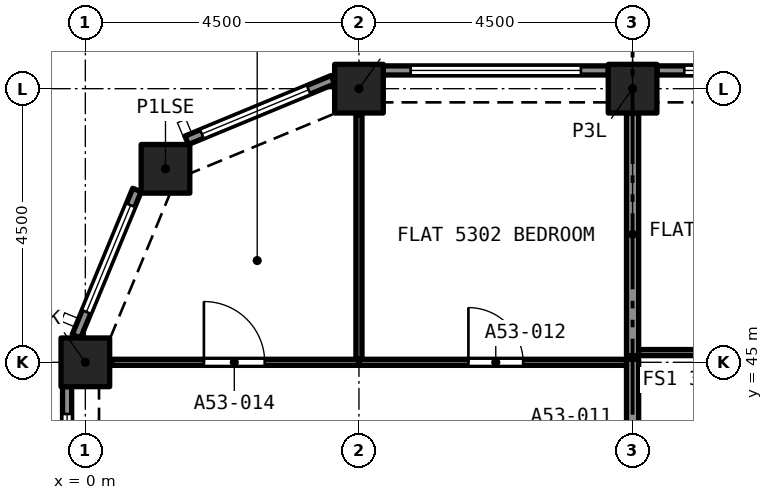
"""IFC4 building model, lengths in metres.
Left out: names, types, materials, properties, quantities, classifications, styles, units other than length and angle.
Written with IfcOpenShell. Run it as: python <this file> out.ifc"""

import sys

from ifc_helpers import new_model, si_unit, direction, frame, frame_2d, origin, origin_2d, place, context, subcontext, project, spatial, rectangle, extrude, element, fill, save


model = new_model("IFC4")
c1 = context("Model", 3, precision=1e-05, world=origin(), true_north=direction((0.0, 1.0)))
c2 = subcontext(c1, "Body", "Model", "MODEL_VIEW")
j1 = project(units=[si_unit("LENGTHUNIT", "METRE"), si_unit("PLANEANGLEUNIT", "RADIAN")], contexts=[c1])
p1 = place(None, origin())
s1 = spatial("IfcSite", under=j1, at=p1, CompositionType="ELEMENT")
p2 = place(p1, origin())
s2 = spatial("IfcBuilding", under=s1, at=p2, CompositionType="ELEMENT")
p3 = place(p2, frame((0.0, 0.0, 192.3)))
s3 = spatial("IfcBuildingStorey", under=s2, at=p3, CompositionType="ELEMENT", Elevation=192.3)
for number, where, z_axis, x_axis in (
    (1, (0.0, 45.0, 0.0), (0.0, 0.0, 1.0), (1.0, 0.0, 0.0)),
    (2, (1.318, 48.182, 0.0), (0.0, 0.0, 1.0), (1.0, 0.0, 0.0)),
    (3, (4.5, 49.5, 0.0), (0.0, 0.0, 1.0), (1.0, 0.0, 0.0)),
    (4, (9.0, 49.5, 0.0), (0.0, 0.0, 1.0), (1.0, 0.0, 0.0)),
):
    element("IfcColumn", number, at=place(p3, frame(where, z_axis=z_axis, x_axis=x_axis)), inside=s3, PredefinedType="COLUMN", context=c2, shape_type="SweptSolid", body=[
        extrude(rectangle(XDim=0.8, YDim=0.8, at=origin_2d()), origin(), (0.0, 0.0, 1.0), 3.2),
    ])
p4 = place(p3, frame((9.4, 49.8, 0.0), z_axis=(0.0, 0.0, 1.0), x_axis=(1.0, 0.0, 0.0)))
e5 = element("IfcWall", 5, at=p4, inside=s3, PredefinedType="SOLIDWALL", context=c2, shape_type="SweptSolid", body=[
    extrude(rectangle(XDim=3.7, YDim=0.15, at=frame_2d((1.85, 0.0))), origin(), (0.0, 0.0, 1.0), 3.2),
])
p5 = place(p4, frame((0.45, 0.0, 0.45)))
e6 = element("IfcOpeningElement", 6, at=p5, cuts=e5, PredefinedType="OPENING", context=c2, shape_type="SweptSolid", body=[
    extrude(rectangle(XDim=2.8, YDim=1.95, at=frame_2d((1.4, 0.975))), frame((0.0, 0.085, 0.0), z_axis=(0.0, -1.0, 0.0), x_axis=(1.0, 0.0, 0.0)), (0.0, 0.0, 1.0), 0.17),
])
p6 = place(p3, frame((4.9, 49.8, 0.0), z_axis=(0.0, 0.0, 1.0), x_axis=(1.0, 0.0, 0.0)))
e7 = element("IfcWall", 7, at=p6, inside=s3, PredefinedType="SOLIDWALL", context=c2, shape_type="SweptSolid", body=[
    extrude(rectangle(XDim=3.7, YDim=0.15, at=frame_2d((1.85, 0.0))), origin(), (0.0, 0.0, 1.0), 3.2),
])
p7 = place(p6, frame((0.45, 0.0, 0.45)))
e8 = element("IfcOpeningElement", 8, at=p7, cuts=e7, PredefinedType="OPENING", context=c2, shape_type="SweptSolid", body=[
    extrude(rectangle(XDim=2.8, YDim=1.95, at=frame_2d((1.4, 0.975))), frame((0.0, 0.085, 0.0), z_axis=(0.0, -1.0, 0.0), x_axis=(1.0, 0.0, 0.0)), (0.0, 0.0, 1.0), 0.17),
])
p8 = place(p3, frame((1.667, 48.651, 0.0), z_axis=(0.0, 0.0, 1.0), x_axis=(0.923885342263, 0.382669406082, 0.0)))
e9 = element("IfcWall", 9, at=p8, inside=s3, PredefinedType="SOLIDWALL", context=c2, shape_type="SweptSolid", body=[
    extrude(rectangle(XDim=2.602, YDim=0.15, at=frame_2d((1.301, 0.0))), origin(), (0.0, 0.0, 1.0), 3.2),
])
p9 = place(p8, frame((0.27, 0.0, 0.45)))
e10 = element("IfcOpeningElement", 10, at=p9, cuts=e9, PredefinedType="OPENING", context=c2, shape_type="SweptSolid", body=[
    extrude(rectangle(XDim=1.9, YDim=1.95, at=frame_2d((0.95, 0.975))), frame((0.0, 0.085, 0.0), z_axis=(0.0, -1.0, 0.0), x_axis=(1.0, 0.0, 0.0)), (0.0, 0.0, 1.0), 0.17),
])
p10 = place(p3, frame((-0.147, 45.429, 0.0), z_axis=(0.0, 0.0, 1.0), x_axis=(0.382669406082, 0.923885342263, 0.0)))
e11 = element("IfcWall", 11, at=p10, inside=s3, PredefinedType="SOLIDWALL", context=c2, shape_type="SweptSolid", body=[
    extrude(rectangle(XDim=2.602, YDim=0.15, at=frame_2d((1.301, 0.0))), origin(), (0.0, 0.0, 1.0), 3.2),
])
p11 = place(p10, frame((0.432, 0.0, 0.45)))
e12 = element("IfcOpeningElement", 12, at=p11, cuts=e11, PredefinedType="OPENING", context=c2, shape_type="SweptSolid", body=[
    extrude(rectangle(XDim=1.9, YDim=1.95, at=frame_2d((0.95, 0.975))), frame((0.0, 0.085, 0.0), z_axis=(0.0, -1.0, 0.0), x_axis=(1.0, 0.0, 0.0)), (0.0, 0.0, 1.0), 0.17),
])
p12 = place(p3, frame((-0.3, 40.9, 0.0), z_axis=(0.0, 0.0, 1.0), x_axis=(0.0, 1.0, 0.0)))
e13 = element("IfcWall", 13, at=p12, inside=s3, PredefinedType="SOLIDWALL", context=c2, shape_type="SweptSolid", body=[
    extrude(rectangle(XDim=3.7, YDim=0.15, at=frame_2d((1.85, 0.0))), origin(), (0.0, 0.0, 1.0), 3.2),
])
p13 = place(p12, frame((0.45, 0.0, 0.45)))
e14 = element("IfcOpeningElement", 14, at=p13, cuts=e13, PredefinedType="OPENING", context=c2, shape_type="SweptSolid", body=[
    extrude(rectangle(XDim=2.8, YDim=1.95, at=frame_2d((1.4, 0.975))), frame((0.0, 0.085, 0.0), z_axis=(0.0, -1.0, 0.0), x_axis=(1.0, 0.0, 0.0)), (0.0, 0.0, 1.0), 0.17),
])
p14 = place(p3, frame((4.5, 45.0, 0.0), z_axis=(0.0, 0.0, 1.0), x_axis=(1.0, 0.0, 0.0)))
e15 = element("IfcWall", 15, at=p14, inside=s3, PredefinedType="PARTITIONING", context=c2, shape_type="SweptSolid", body=[
    extrude(rectangle(XDim=4.4, YDim=0.1, at=frame_2d((2.2, 0.0))), origin(), (0.0, 0.0, 1.0), 2.9),
])
p15 = place(p14, frame((1.8, 0.0, 0.0)))
e16 = element("IfcOpeningElement", 16, at=p15, cuts=e15, PredefinedType="OPENING", context=c2, shape_type="SweptSolid", body=[
    extrude(rectangle(XDim=0.9, YDim=2.1, at=frame_2d((0.45, 1.05))), frame((0.0, 0.06, 0.0), z_axis=(0.0, -1.0, 0.0), x_axis=(1.0, 0.0, 0.0)), (0.0, 0.0, 1.0), 0.12),
])
p16 = place(p3, frame((4.5, 45.05, 0.0), z_axis=(0.0, 0.0, 1.0), x_axis=(0.0, 1.0, 0.0)))
e17 = element("IfcWall", 17, at=p16, inside=s3, PredefinedType="PARTITIONING", context=c2, shape_type="SweptSolid", body=[
    extrude(rectangle(XDim=4.017, YDim=0.1, at=frame_2d((2.009, 0.0))), origin(), (0.0, 0.0, 1.0), 2.9),
])
p17 = place(p3, frame((9.0, 45.11, 0.0), z_axis=(0.0, 0.0, 1.0), x_axis=(0.0, 1.0, 0.0)))
e18 = element("IfcWall", 18, at=p17, inside=s3, PredefinedType="PARTITIONING", context=c2, shape_type="SweptSolid", body=[
    extrude(rectangle(XDim=3.99, YDim=0.2, at=frame_2d((1.995, 0.0))), origin(), (0.0, 0.0, 1.0), 2.9),
])
p18 = place(p3, frame((0.433, 45.0, 0.0), z_axis=(0.0, 0.0, 1.0), x_axis=(1.0, 0.0, 0.0)))
e19 = element("IfcWall", 19, at=p18, inside=s3, PredefinedType="PARTITIONING", context=c2, shape_type="SweptSolid", body=[
    extrude(rectangle(XDim=4.067, YDim=0.1, at=frame_2d((2.034, 0.0))), origin(), (0.0, 0.0, 1.0), 2.9),
])
p19 = place(p18, frame((1.517, 0.0, 0.0)))
e20 = element("IfcOpeningElement", 20, at=p19, cuts=e19, PredefinedType="OPENING", context=c2, shape_type="SweptSolid", body=[
    extrude(rectangle(XDim=1.0, YDim=2.1, at=frame_2d((0.5, 1.05))), frame((0.0, 0.06, 0.0), z_axis=(0.0, -1.0, 0.0), x_axis=(1.0, 0.0, 0.0)), (0.0, 0.0, 1.0), 0.12),
])
p20 = place(p3, frame((9.0, 43.69, 0.0), z_axis=(0.0, 0.0, 1.0), x_axis=(0.0, 1.0, 0.0)))
e21 = element("IfcWall", 21, at=p20, inside=s3, PredefinedType="PARTITIONING", context=c2, shape_type="SweptSolid", body=[
    extrude(rectangle(XDim=1.36, YDim=0.2, at=frame_2d((0.68, 0.0))), origin(), (0.0, 0.0, 1.0), 2.9),
])
p21 = place(p3, frame((9.1, 45.16, 0.0), z_axis=(0.0, 0.0, 1.0), x_axis=(1.0, 0.0, 0.0)))
e22 = element("IfcWall", 22, at=p21, inside=s3, PredefinedType="PARTITIONING", context=c2, shape_type="SweptSolid", body=[
    extrude(rectangle(XDim=4.4, YDim=0.1, at=frame_2d((2.2, 0.0))), origin(), (0.0, 0.0, 1.0), 2.9),
])
p22 = place(p21, frame((1.65, 0.0, 0.0)))
e23 = element("IfcOpeningElement", 23, at=p22, cuts=e22, PredefinedType="OPENING", context=c2, shape_type="SweptSolid", body=[
    extrude(rectangle(XDim=1.0, YDim=2.1, at=frame_2d((0.5, 1.05))), frame((0.0, 0.06, 0.0), z_axis=(0.0, -1.0, 0.0), x_axis=(1.0, 0.0, 0.0)), (0.0, 0.0, 1.0), 0.12),
])
p23 = place(p5, origin())
e24 = element("IfcWindow", 24, at=p23, inside=s3, PartitioningType="SINGLE_PANEL", PredefinedType="WINDOW", context=c2, shape_type="SweptSolid", body=[
    extrude(rectangle(XDim=2.8, YDim=1.95, at=frame_2d((1.4, 0.975))), frame((0.0, 0.03, 0.0), z_axis=(0.0, -1.0, 0.0), x_axis=(1.0, 0.0, 0.0)), (0.0, 0.0, 1.0), 0.06),
])
fill(e6, e24)
p24 = place(p7, origin())
e25 = element("IfcWindow", 25, at=p24, inside=s3, PartitioningType="SINGLE_PANEL", PredefinedType="WINDOW", context=c2, shape_type="SweptSolid", body=[
    extrude(rectangle(XDim=2.8, YDim=1.95, at=frame_2d((1.4, 0.975))), frame((0.0, 0.03, 0.0), z_axis=(0.0, -1.0, 0.0), x_axis=(1.0, 0.0, 0.0)), (0.0, 0.0, 1.0), 0.06),
])
fill(e8, e25)
p25 = place(p9, origin())
e26 = element("IfcWindow", 26, at=p25, inside=s3, PartitioningType="SINGLE_PANEL", PredefinedType="WINDOW", context=c2, shape_type="SweptSolid", body=[
    extrude(rectangle(XDim=1.9, YDim=1.95, at=frame_2d((0.95, 0.975))), frame((0.0, 0.03, 0.0), z_axis=(0.0, -1.0, 0.0), x_axis=(1.0, 0.0, 0.0)), (0.0, 0.0, 1.0), 0.06),
])
fill(e10, e26)
p26 = place(p11, origin())
e27 = element("IfcWindow", 27, at=p26, inside=s3, PartitioningType="SINGLE_PANEL", PredefinedType="WINDOW", context=c2, shape_type="SweptSolid", body=[
    extrude(rectangle(XDim=1.9, YDim=1.95, at=frame_2d((0.95, 0.975))), frame((0.0, 0.03, 0.0), z_axis=(0.0, -1.0, 0.0), x_axis=(1.0, 0.0, 0.0)), (0.0, 0.0, 1.0), 0.06),
])
fill(e12, e27)
p27 = place(p13, origin())
e28 = element("IfcWindow", 28, at=p27, inside=s3, PartitioningType="SINGLE_PANEL", PredefinedType="WINDOW", context=c2, shape_type="SweptSolid", body=[
    extrude(rectangle(XDim=2.8, YDim=1.95, at=frame_2d((1.4, 0.975))), frame((0.0, 0.03, 0.0), z_axis=(0.0, -1.0, 0.0), x_axis=(1.0, 0.0, 0.0)), (0.0, 0.0, 1.0), 0.06),
])
fill(e14, e28)
p28 = place(p15, origin())
e29 = element("IfcDoor", 29, at=p28, inside=s3, OperationType="SINGLE_SWING_RIGHT", PredefinedType="DOOR", context=c2, shape_type="SweptSolid", body=[
    extrude(rectangle(XDim=0.9, YDim=2.1, at=frame_2d((0.45, 1.05))), frame((0.0, 0.025, 0.0), z_axis=(0.0, -1.0, 0.0), x_axis=(1.0, 0.0, 0.0)), (0.0, 0.0, 1.0), 0.05),
])
fill(e16, e29)
p29 = place(p19, origin())
e30 = element("IfcDoor", 30, at=p29, inside=s3, OperationType="SINGLE_SWING_LEFT", PredefinedType="DOOR", context=c2, shape_type="SweptSolid", body=[
    extrude(rectangle(XDim=1.0, YDim=2.1, at=frame_2d((0.5, 1.05))), frame((0.0, 0.025, 0.0), z_axis=(0.0, -1.0, 0.0), x_axis=(1.0, 0.0, 0.0)), (0.0, 0.0, 1.0), 0.05),
])
fill(e20, e30)
save(model, sys.argv[1])
